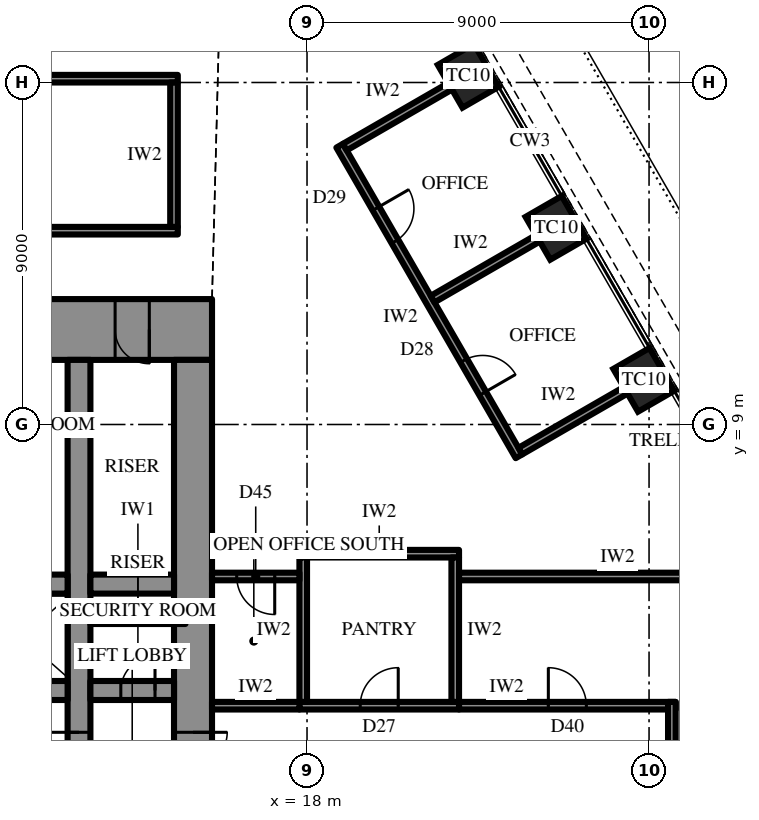
"""IFC4 building model, lengths in metres.
Left out: names, types, materials, properties, quantities, classifications, styles, units other than length and angle.
Written with IfcOpenShell. Run it as: python <this file> out.ifc"""

import sys

from ifc_helpers import new_model, si_unit, direction, frame, frame_2d, origin, origin_2d, place, context, subcontext, project, spatial, rectangle, extrude, element, fill, save


model = new_model("IFC4")
c1 = context("Model", 3, precision=1e-05, world=origin(), true_north=direction((0.0, 1.0)))
c2 = subcontext(c1, "Body", "Model", "MODEL_VIEW")
j1 = project(units=[si_unit("LENGTHUNIT", "METRE"), si_unit("PLANEANGLEUNIT", "RADIAN")], contexts=[c1])
p1 = place(None, origin())
s1 = spatial("IfcSite", under=j1, at=p1, CompositionType="ELEMENT")
p2 = place(p1, origin())
s2 = spatial("IfcBuilding", under=s1, at=p2, CompositionType="ELEMENT")
p3 = place(p2, frame((0.0, 0.0, 249.1)))
s3 = spatial("IfcBuildingStorey", under=s2, at=p3, CompositionType="ELEMENT", Elevation=249.1)
for number, where, z_axis, x_axis in (
    (1, (26.861, 10.175, 0.0), (0.0, 0.0, 1.0), (-0.5, 0.866, 0.0)),
    (2, (24.552, 14.175, 0.0), (0.0, 0.0, 1.0), (-0.5, 0.866, 0.0)),
    (3, (22.242, 18.175, 0.0), (0.0, 0.0, 1.0), (-0.5, 0.866, 0.0)),
):
    element("IfcColumn", number, at=place(p3, frame(where, z_axis=z_axis, x_axis=x_axis)), inside=s3, PredefinedType="COLUMN", context=c2, shape_type="SweptSolid", body=[
        extrude(rectangle(XDim=1.3, YDim=1.1, at=origin_2d()), origin(), (0.0, 0.0, 1.0), 4.2),
    ])
p4 = place(p3, frame((-15.5, 11.5, 0.0), z_axis=(0.0, 0.0, 1.0), x_axis=(1.0, 0.0, 0.0)))
e4 = element("IfcWall", 4, at=p4, inside=s3, PredefinedType="SHEAR", context=c2, shape_type="SweptSolid", body=[
    extrude(rectangle(XDim=31.0, YDim=1.6, at=frame_2d((15.5, 0.0))), origin(), (0.0, 0.0, 1.0), 4.2),
])
p5 = place(p4, frame((16.35, 0.0, 0.0)))
e5 = element("IfcOpeningElement", 5, at=p5, cuts=e4, PredefinedType="OPENING", context=c2, shape_type="SweptSolid", body=[
    extrude(rectangle(XDim=0.9, YDim=2.2, at=frame_2d((0.45, 1.1))), frame((0.0, 0.81, 0.0), z_axis=(0.0, -1.0, 0.0), x_axis=(1.0, 0.0, 0.0)), (0.0, 0.0, 1.0), 1.62),
])
p6 = place(p4, frame((19.35, 0.0, 0.0)))
e6 = element("IfcOpeningElement", 6, at=p6, cuts=e4, PredefinedType="OPENING", context=c2, shape_type="SweptSolid", body=[
    extrude(rectangle(XDim=0.9, YDim=2.2, at=frame_2d((0.45, 1.1))), frame((0.0, 0.81, 0.0), z_axis=(0.0, -1.0, 0.0), x_axis=(1.0, 0.0, 0.0)), (0.0, 0.0, 1.0), 1.62),
])
p7 = place(p4, frame((22.4, 0.0, 0.0)))
e7 = element("IfcOpeningElement", 7, at=p7, cuts=e4, PredefinedType="OPENING", context=c2, shape_type="SweptSolid", body=[
    extrude(rectangle(XDim=1.0, YDim=2.2, at=frame_2d((0.5, 1.1))), frame((0.0, 0.81, 0.0), z_axis=(0.0, -1.0, 0.0), x_axis=(1.0, 0.0, 0.0)), (0.0, 0.0, 1.0), 1.62),
])
p8 = place(p4, frame((1.65, 0.0, 0.0)))
e8 = element("IfcOpeningElement", 8, at=p8, cuts=e4, PredefinedType="OPENING", context=c2, shape_type="SweptSolid", body=[
    extrude(rectangle(XDim=0.9, YDim=2.2, at=frame_2d((0.45, 1.1))), frame((0.0, 0.81, 0.0), z_axis=(0.0, -1.0, 0.0), x_axis=(1.0, 0.0, 0.0)), (0.0, 0.0, 1.0), 1.62),
])
p9 = place(p4, frame((4.65, 0.0, 0.0)))
e9 = element("IfcOpeningElement", 9, at=p9, cuts=e4, PredefinedType="OPENING", context=c2, shape_type="SweptSolid", body=[
    extrude(rectangle(XDim=0.9, YDim=2.2, at=frame_2d((0.45, 1.1))), frame((0.0, 0.81, 0.0), z_axis=(0.0, -1.0, 0.0), x_axis=(1.0, 0.0, 0.0)), (0.0, 0.0, 1.0), 1.62),
])
p10 = place(p4, frame((25.45, 0.0, 0.0)))
e10 = element("IfcOpeningElement", 10, at=p10, cuts=e4, PredefinedType="OPENING", context=c2, shape_type="SweptSolid", body=[
    extrude(rectangle(XDim=0.9, YDim=2.2, at=frame_2d((0.45, 1.1))), frame((0.0, 0.81, 0.0), z_axis=(0.0, -1.0, 0.0), x_axis=(1.0, 0.0, 0.0)), (0.0, 0.0, 1.0), 1.62),
])
p11 = place(p4, frame((28.45, 0.0, 0.0)))
e11 = element("IfcOpeningElement", 11, at=p11, cuts=e4, PredefinedType="OPENING", context=c2, shape_type="SweptSolid", body=[
    extrude(rectangle(XDim=0.9, YDim=2.2, at=frame_2d((0.45, 1.1))), frame((0.0, 0.81, 0.0), z_axis=(0.0, -1.0, 0.0), x_axis=(1.0, 0.0, 0.0)), (0.0, 0.0, 1.0), 1.62),
])
p12 = place(p3, frame((15.0, -10.7, 0.0), z_axis=(0.0, 0.0, 1.0), x_axis=(0.0, 1.0, 0.0)))
e12 = element("IfcWall", 12, at=p12, inside=s3, PredefinedType="SHEAR", context=c2, shape_type="SweptSolid", body=[
    extrude(rectangle(XDim=21.4, YDim=1.0, at=frame_2d((10.7, 0.0))), origin(), (0.0, 0.0, 1.0), 4.2),
])
p13 = place(p12, frame((9.8, 0.0, 0.0)))
e13 = element("IfcOpeningElement", 13, at=p13, cuts=e12, PredefinedType="OPENING", context=c2, shape_type="SweptSolid", body=[
    extrude(rectangle(XDim=1.8, YDim=2.4, at=frame_2d((0.9, 1.2))), frame((0.0, 0.51, 0.0), z_axis=(0.0, -1.0, 0.0), x_axis=(1.0, 0.0, 0.0)), (0.0, 0.0, 1.0), 1.02),
])
p14 = place(p3, frame((12.0, -10.7, 0.0), z_axis=(0.0, 0.0, 1.0), x_axis=(0.0, 1.0, 0.0)))
e14 = element("IfcWall", 14, at=p14, inside=s3, PredefinedType="SHEAR", context=c2, shape_type="SweptSolid", body=[
    extrude(rectangle(XDim=21.4, YDim=0.6, at=frame_2d((10.7, 0.0))), origin(), (0.0, 0.0, 1.0), 4.2),
])
p15 = place(p14, frame((9.8, 0.0, 0.0)))
e15 = element("IfcOpeningElement", 15, at=p15, cuts=e14, PredefinedType="OPENING", context=c2, shape_type="SweptSolid", body=[
    extrude(rectangle(XDim=1.8, YDim=2.4, at=frame_2d((0.9, 1.2))), frame((0.0, 0.31, 0.0), z_axis=(0.0, -1.0, 0.0), x_axis=(1.0, 0.0, 0.0)), (0.0, 0.0, 1.0), 0.62),
])
p16 = place(p3, frame((-3.2, 2.0, 0.0), z_axis=(0.0, 0.0, 1.0), x_axis=(1.0, 0.0, 0.0)))
e16 = element("IfcWall", 16, at=p16, inside=s3, PredefinedType="SHEAR", context=c2, shape_type="SweptSolid", body=[
    extrude(rectangle(XDim=14.9, YDim=0.5, at=frame_2d((7.45, 0.0))), origin(), (0.0, 0.0, 1.0), 4.2),
])
p17 = place(p16, frame((1.15, 0.0, 0.0)))
e17 = element("IfcOpeningElement", 17, at=p17, cuts=e16, PredefinedType="OPENING", context=c2, shape_type="SweptSolid", body=[
    extrude(rectangle(XDim=1.1, YDim=2.2, at=frame_2d((0.55, 1.1))), frame((0.0, 0.26, 0.0), z_axis=(0.0, -1.0, 0.0), x_axis=(1.0, 0.0, 0.0)), (0.0, 0.0, 1.0), 0.52),
])
p18 = place(p16, frame((4.15, 0.0, 0.0)))
e18 = element("IfcOpeningElement", 18, at=p18, cuts=e16, PredefinedType="OPENING", context=c2, shape_type="SweptSolid", body=[
    extrude(rectangle(XDim=1.1, YDim=2.2, at=frame_2d((0.55, 1.1))), frame((0.0, 0.26, 0.0), z_axis=(0.0, -1.0, 0.0), x_axis=(1.0, 0.0, 0.0)), (0.0, 0.0, 1.0), 0.52),
])
p19 = place(p16, frame((7.15, 0.0, 0.0)))
e19 = element("IfcOpeningElement", 19, at=p19, cuts=e16, PredefinedType="OPENING", context=c2, shape_type="SweptSolid", body=[
    extrude(rectangle(XDim=1.1, YDim=2.2, at=frame_2d((0.55, 1.1))), frame((0.0, 0.26, 0.0), z_axis=(0.0, -1.0, 0.0), x_axis=(1.0, 0.0, 0.0)), (0.0, 0.0, 1.0), 0.52),
])
p20 = place(p16, frame((10.15, 0.0, 0.0)))
e20 = element("IfcOpeningElement", 20, at=p20, cuts=e16, PredefinedType="OPENING", context=c2, shape_type="SweptSolid", body=[
    extrude(rectangle(XDim=1.1, YDim=2.2, at=frame_2d((0.55, 1.1))), frame((0.0, 0.26, 0.0), z_axis=(0.0, -1.0, 0.0), x_axis=(1.0, 0.0, 0.0)), (0.0, 0.0, 1.0), 0.52),
])
p21 = place(p3, frame((12.3, 2.0, 0.0), z_axis=(0.0, 0.0, 1.0), x_axis=(1.0, 0.0, 0.0)))
e21 = element("IfcWall", 21, at=p21, inside=s3, PredefinedType="SHEAR", context=c2, shape_type="SweptSolid", body=[
    extrude(rectangle(XDim=2.2, YDim=0.5, at=frame_2d((1.1, 0.0))), origin(), (0.0, 0.0, 1.0), 4.2),
])
p22 = place(p21, frame((0.8, 0.0, 0.0)))
e22 = element("IfcOpeningElement", 22, at=p22, cuts=e21, PredefinedType="OPENING", context=c2, shape_type="SweptSolid", body=[
    extrude(rectangle(XDim=0.9, YDim=2.2, at=frame_2d((0.45, 1.1))), frame((0.0, 0.26, 0.0), z_axis=(0.0, -1.0, 0.0), x_axis=(1.0, 0.0, 0.0)), (0.0, 0.0, 1.0), 0.52),
])
p23 = place(p3, frame((-11.7, 4.8, 0.0), z_axis=(0.0, 0.0, 1.0), x_axis=(1.0, 0.0, 0.0)))
e23 = element("IfcWall", 23, at=p23, inside=s3, PredefinedType="SHEAR", context=c2, shape_type="SweptSolid", body=[
    extrude(rectangle(XDim=23.4, YDim=0.5, at=frame_2d((11.7, 0.0))), origin(), (0.0, 0.0, 1.0), 4.2),
])
p24 = place(p23, frame((6.6, 0.0, 0.0)))
e24 = element("IfcOpeningElement", 24, at=p24, cuts=e23, PredefinedType="OPENING", context=c2, shape_type="SweptSolid", body=[
    extrude(rectangle(XDim=1.2, YDim=2.2, at=frame_2d((0.6, 1.1))), frame((0.0, 0.26, 0.0), z_axis=(0.0, -1.0, 0.0), x_axis=(1.0, 0.0, 0.0)), (0.0, 0.0, 1.0), 0.52),
])
p25 = place(p23, frame((3.6, 0.0, 0.0)))
e25 = element("IfcOpeningElement", 25, at=p25, cuts=e23, PredefinedType="OPENING", context=c2, shape_type="SweptSolid", body=[
    extrude(rectangle(XDim=1.2, YDim=2.2, at=frame_2d((0.6, 1.1))), frame((0.0, 0.26, 0.0), z_axis=(0.0, -1.0, 0.0), x_axis=(1.0, 0.0, 0.0)), (0.0, 0.0, 1.0), 0.52),
])
p26 = place(p3, frame((12.3, 4.8, 0.0), z_axis=(0.0, 0.0, 1.0), x_axis=(1.0, 0.0, 0.0)))
e26 = element("IfcWall", 26, at=p26, inside=s3, PredefinedType="SHEAR", context=c2, shape_type="SweptSolid", body=[
    extrude(rectangle(XDim=2.2, YDim=0.5, at=frame_2d((1.1, 0.0))), origin(), (0.0, 0.0, 1.0), 4.2),
])
p27 = place(p3, frame((12.3, 3.85, 0.0), z_axis=(0.0, 0.0, 1.0), x_axis=(1.0, 0.0, 0.0)))
e27 = element("IfcWall", 27, at=p27, inside=s3, PredefinedType="PARTITIONING", context=c2, shape_type="SweptSolid", body=[
    extrude(rectangle(XDim=2.5, YDim=0.2, at=frame_2d((1.25, 0.0))), origin(), (0.0, 0.0, 1.0), 4.0),
])
p28 = place(p3, frame((-14.6, 14.1, 0.0), z_axis=(0.0, 0.0, 1.0), x_axis=(1.0, 0.0, 0.0)))
e28 = element("IfcWall", 28, at=p28, inside=s3, PredefinedType="PARTITIONING", context=c2, shape_type="SweptSolid", body=[
    extrude(rectangle(XDim=29.2, YDim=0.2, at=frame_2d((14.6, 0.0))), origin(), (0.0, 0.0, 1.0), 4.0),
])
p29 = place(p3, frame((-14.6, 18.1, 0.0), z_axis=(0.0, 0.0, 1.0), x_axis=(1.0, 0.0, 0.0)))
e29 = element("IfcWall", 29, at=p29, inside=s3, PredefinedType="PARTITIONING", context=c2, shape_type="SweptSolid", body=[
    extrude(rectangle(XDim=29.2, YDim=0.2, at=frame_2d((14.6, 0.0))), origin(), (0.0, 0.0, 1.0), 4.0),
])
p30 = place(p29, frame((13.7, 0.0, 0.0)))
e30 = element("IfcOpeningElement", 30, at=p30, cuts=e29, PredefinedType="OPENING", context=c2, shape_type="SweptSolid", body=[
    extrude(rectangle(XDim=1.8, YDim=2.4, at=frame_2d((0.9, 1.2))), frame((0.0, 0.11, 0.0), z_axis=(0.0, -1.0, 0.0), x_axis=(1.0, 0.0, 0.0)), (0.0, 0.0, 1.0), 0.22),
])
p31 = place(p3, frame((14.5, 14.2, 0.0), z_axis=(0.0, 0.0, 1.0), x_axis=(0.0, 1.0, 0.0)))
e31 = element("IfcWall", 31, at=p31, inside=s3, PredefinedType="PARTITIONING", context=c2, shape_type="SweptSolid", body=[
    extrude(rectangle(XDim=3.8, YDim=0.2, at=frame_2d((1.9, 0.0))), origin(), (0.0, 0.0, 1.0), 4.0),
])
p32 = place(p3, frame((23.577, 8.163, 0.0), z_axis=(0.0, 0.0, 1.0), x_axis=(-0.499989672313, 0.866031366395, 0.0)))
e32 = element("IfcWall", 32, at=p32, inside=s3, PredefinedType="PARTITIONING", context=c2, shape_type="SweptSolid", body=[
    extrude(rectangle(XDim=9.438, YDim=0.2, at=frame_2d((4.719, 0.0))), origin(), (0.0, 0.0, 1.0), 4.0),
])
p33 = place(p32, frame((1.909, 0.0, 0.0)))
e33 = element("IfcOpeningElement", 33, at=p33, cuts=e32, PredefinedType="OPENING", context=c2, shape_type="SweptSolid", body=[
    extrude(rectangle(XDim=1.0, YDim=2.2, at=frame_2d((0.5, 1.1))), frame((0.0, 0.11, 0.0), z_axis=(0.0, -1.0, 0.0), x_axis=(1.0, 0.0, 0.0)), (0.0, 0.0, 1.0), 0.22),
])
p34 = place(p32, frame((6.528, 0.0, 0.0)))
e34 = element("IfcOpeningElement", 34, at=p34, cuts=e32, PredefinedType="OPENING", context=c2, shape_type="SweptSolid", body=[
    extrude(rectangle(XDim=1.0, YDim=2.2, at=frame_2d((0.5, 1.1))), frame((0.0, 0.11, 0.0), z_axis=(0.0, -1.0, 0.0), x_axis=(1.0, 0.0, 0.0)), (0.0, 0.0, 1.0), 0.22),
])
p35 = place(p3, frame((23.614, 8.3, 0.0), z_axis=(0.0, 0.0, 1.0), x_axis=(0.866061088033, 0.499938187974, 0.0)))
e35 = element("IfcWall", 35, at=p35, inside=s3, PredefinedType="PARTITIONING", context=c2, shape_type="SweptSolid", body=[
    extrude(rectangle(XDim=3.2, YDim=0.2, at=frame_2d((1.6, 0.0))), origin(), (0.0, 0.0, 1.0), 3.082),
])
for number, where, z_axis, x_axis in (
    (36, (21.304, 12.3, 0.0), (0.0, 0.0, 1.0), (0.866, 0.5, 0.0)),
    (37, (18.995, 16.3, 0.0), (0.0, 0.0, 1.0), (0.866, 0.5, 0.0)),
):
    element("IfcWall", number, at=place(p3, frame(where, z_axis=z_axis, x_axis=x_axis)), inside=s3, PredefinedType="PARTITIONING", context=c2, shape_type="SweptSolid", body=[
        extrude(rectangle(XDim=3.2, YDim=0.2, at=frame_2d((1.6, 0.0))), origin(), (0.0, 0.0, 1.0), 3.082),
    ])
p36 = place(p3, frame((17.8, 1.6, 0.0), z_axis=(0.0, 0.0, 1.0), x_axis=(1.0, 0.0, 0.0)))
e38 = element("IfcWall", 38, at=p36, inside=s3, PredefinedType="PARTITIONING", context=c2, shape_type="SweptSolid", body=[
    extrude(rectangle(XDim=4.2, YDim=0.2, at=frame_2d((2.1, 0.0))), origin(), (0.0, 0.0, 1.0), 4.0),
])
p37 = place(p36, frame((1.6, 0.0, 0.0)))
e39 = element("IfcOpeningElement", 39, at=p37, cuts=e38, PredefinedType="OPENING", context=c2, shape_type="SweptSolid", body=[
    extrude(rectangle(XDim=1.0, YDim=2.2, at=frame_2d((0.5, 1.1))), frame((0.0, 0.11, 0.0), z_axis=(0.0, -1.0, 0.0), x_axis=(1.0, 0.0, 0.0)), (0.0, 0.0, 1.0), 0.22),
])
p38 = place(p3, frame((17.8, 5.6, 0.0), z_axis=(0.0, 0.0, 1.0), x_axis=(1.0, 0.0, 0.0)))
e40 = element("IfcWall", 40, at=p38, inside=s3, PredefinedType="PARTITIONING", context=c2, shape_type="SweptSolid", body=[
    extrude(rectangle(XDim=4.2, YDim=0.2, at=frame_2d((2.1, 0.0))), origin(), (0.0, 0.0, 1.0), 4.0),
])
for number, where, z_axis, x_axis in (
    (41, (17.9, 1.7, 0.0), (0.0, 0.0, 1.0), (0.0, 1.0, 0.0)),
    (42, (21.9, 1.7, 0.0), (0.0, 0.0, 1.0), (0.0, 1.0, 0.0)),
):
    element("IfcWall", number, at=place(p3, frame(where, z_axis=z_axis, x_axis=x_axis)), inside=s3, PredefinedType="PARTITIONING", context=c2, shape_type="SweptSolid", body=[
        extrude(rectangle(XDim=3.8, YDim=0.2, at=frame_2d((1.9, 0.0))), origin(), (0.0, 0.0, 1.0), 4.0),
    ])
p39 = place(p3, frame((15.5, 1.6, 0.0), z_axis=(0.0, 0.0, 1.0), x_axis=(1.0, 0.0, 0.0)))
e43 = element("IfcWall", 43, at=p39, inside=s3, PredefinedType="PARTITIONING", context=c2, shape_type="SweptSolid", body=[
    extrude(rectangle(XDim=2.3, YDim=0.2, at=frame_2d((1.15, 0.0))), origin(), (0.0, 0.0, 1.0), 4.0),
])
p40 = place(p3, frame((22.0, 1.6, 0.0), z_axis=(0.0, 0.0, 1.0), x_axis=(1.0, 0.0, 0.0)))
e44 = element("IfcWall", 44, at=p40, inside=s3, PredefinedType="PARTITIONING", context=c2, shape_type="SweptSolid", body=[
    extrude(rectangle(XDim=5.7, YDim=0.2, at=frame_2d((2.85, 0.0))), origin(), (0.0, 0.0, 1.0), 4.0),
])
p41 = place(p40, frame((2.35, 0.0, 0.0)))
e45 = element("IfcOpeningElement", 45, at=p41, cuts=e44, PredefinedType="OPENING", context=c2, shape_type="SweptSolid", body=[
    extrude(rectangle(XDim=1.0, YDim=2.2, at=frame_2d((0.5, 1.1))), frame((0.0, 0.11, 0.0), z_axis=(0.0, -1.0, 0.0), x_axis=(1.0, 0.0, 0.0)), (0.0, 0.0, 1.0), 0.22),
])
p42 = place(p3, frame((27.6, -1.7, 0.0), z_axis=(0.0, 0.0, 1.0), x_axis=(0.0, 1.0, 0.0)))
e46 = element("IfcWall", 46, at=p42, inside=s3, PredefinedType="PARTITIONING", context=c2, shape_type="SweptSolid", body=[
    extrude(rectangle(XDim=3.4, YDim=0.2, at=frame_2d((1.7, 0.0))), origin(), (0.0, 0.0, 1.0), 4.0),
])
p43 = place(p42, frame((1.2, 0.0, 0.0)))
e47 = element("IfcOpeningElement", 47, at=p43, cuts=e46, PredefinedType="OPENING", context=c2, shape_type="SweptSolid", body=[
    extrude(rectangle(XDim=1.0, YDim=2.2, at=frame_2d((0.5, 1.1))), frame((0.0, 0.11, 0.0), z_axis=(0.0, -1.0, 0.0), x_axis=(1.0, 0.0, 0.0)), (0.0, 0.0, 1.0), 0.22),
])
p44 = place(p3, frame((15.5, 5.0, 0.0), z_axis=(0.0, 0.0, 1.0), x_axis=(1.0, 0.0, 0.0)))
e48 = element("IfcWall", 48, at=p44, inside=s3, PredefinedType="PARTITIONING", context=c2, shape_type="SweptSolid", body=[
    extrude(rectangle(XDim=2.3, YDim=0.2, at=frame_2d((1.15, 0.0))), origin(), (0.0, 0.0, 1.0), 4.0),
])
p45 = place(p44, frame((0.65, 0.0, 0.0)))
e49 = element("IfcOpeningElement", 49, at=p45, cuts=e48, PredefinedType="OPENING", context=c2, shape_type="SweptSolid", body=[
    extrude(rectangle(XDim=1.0, YDim=2.2, at=frame_2d((0.5, 1.1))), frame((0.0, 0.11, 0.0), z_axis=(0.0, -1.0, 0.0), x_axis=(1.0, 0.0, 0.0)), (0.0, 0.0, 1.0), 0.22),
])
p46 = place(p3, frame((22.0, 5.0, 0.0), z_axis=(0.0, 0.0, 1.0), x_axis=(1.0, 0.0, 0.0)))
e50 = element("IfcWall", 50, at=p46, inside=s3, PredefinedType="PARTITIONING", context=c2, shape_type="SweptSolid", body=[
    extrude(rectangle(XDim=8.345, YDim=0.2, at=frame_2d((4.173, 0.0))), origin(), (0.0, 0.0, 1.0), 4.0),
])
p47 = place(p13, frame((1.8, 0.0, 0.0), z_axis=(0.0, 0.0, 1.0), x_axis=(-1.0, 0.0, 0.0)))
e51 = element("IfcDoor", 51, at=p47, inside=s3, OperationType="DOUBLE_DOOR_SINGLE_SWING", PredefinedType="DOOR", context=c2, shape_type="SweptSolid", body=[
    extrude(rectangle(XDim=1.8, YDim=2.4, at=frame_2d((0.9, 1.2))), frame((0.0, 0.025, 0.0), z_axis=(0.0, -1.0, 0.0), x_axis=(1.0, 0.0, 0.0)), (0.0, 0.0, 1.0), 0.05),
])
fill(e13, e51)
p48 = place(p11, frame((0.9, 0.0, 0.0), z_axis=(0.0, 0.0, 1.0), x_axis=(-1.0, 0.0, 0.0)))
e52 = element("IfcDoor", 52, at=p48, inside=s3, OperationType="SINGLE_SWING_RIGHT", PredefinedType="DOOR", context=c2, shape_type="SweptSolid", body=[
    extrude(rectangle(XDim=0.9, YDim=2.2, at=frame_2d((0.45, 1.1))), frame((0.0, 0.025, 0.0), z_axis=(0.0, -1.0, 0.0), x_axis=(1.0, 0.0, 0.0)), (0.0, 0.0, 1.0), 0.05),
])
fill(e11, e52)
p49 = place(p22, origin())
e53 = element("IfcDoor", 53, at=p49, inside=s3, OperationType="SINGLE_SWING_LEFT", PredefinedType="DOOR", context=c2, shape_type="SweptSolid", body=[
    extrude(rectangle(XDim=0.9, YDim=2.2, at=frame_2d((0.45, 1.1))), frame((0.0, 0.025, 0.0), z_axis=(0.0, -1.0, 0.0), x_axis=(1.0, 0.0, 0.0)), (0.0, 0.0, 1.0), 0.05),
])
fill(e22, e53)
p50 = place(p15, origin())
e54 = element("IfcDoor", 54, at=p50, inside=s3, OperationType="DOUBLE_DOOR_SINGLE_SWING", PredefinedType="DOOR", context=c2, shape_type="SweptSolid", body=[
    extrude(rectangle(XDim=1.8, YDim=2.4, at=frame_2d((0.9, 1.2))), frame((0.0, 0.025, 0.0), z_axis=(0.0, -1.0, 0.0), x_axis=(1.0, 0.0, 0.0)), (0.0, 0.0, 1.0), 0.05),
])
fill(e15, e54)
p51 = place(p33, frame((1.0, 0.0, 0.0), z_axis=(0.0, 0.0, 1.0), x_axis=(-1.0, 0.0, 0.0)))
e55 = element("IfcDoor", 55, at=p51, inside=s3, OperationType="SINGLE_SWING_LEFT", PredefinedType="DOOR", context=c2, shape_type="SweptSolid", body=[
    extrude(rectangle(XDim=1.0, YDim=2.2, at=frame_2d((0.5, 1.1))), frame((0.0, 0.025, 0.0), z_axis=(0.0, -1.0, 0.0), x_axis=(1.0, 0.0, 0.0)), (0.0, 0.0, 1.0), 0.05),
])
fill(e33, e55)
p52 = place(p34, frame((1.0, 0.0, 0.0), z_axis=(0.0, 0.0, 1.0), x_axis=(-1.0, 0.0, 0.0)))
e56 = element("IfcDoor", 56, at=p52, inside=s3, OperationType="SINGLE_SWING_RIGHT", PredefinedType="DOOR", context=c2, shape_type="SweptSolid", body=[
    extrude(rectangle(XDim=1.0, YDim=2.2, at=frame_2d((0.5, 1.1))), frame((0.0, 0.025, 0.0), z_axis=(0.0, -1.0, 0.0), x_axis=(1.0, 0.0, 0.0)), (0.0, 0.0, 1.0), 0.05),
])
fill(e34, e56)
p53 = place(p37, origin())
e57 = element("IfcDoor", 57, at=p53, inside=s3, OperationType="SINGLE_SWING_LEFT", PredefinedType="DOOR", context=c2, shape_type="SweptSolid", body=[
    extrude(rectangle(XDim=1.0, YDim=2.2, at=frame_2d((0.5, 1.1))), frame((0.0, 0.025, 0.0), z_axis=(0.0, -1.0, 0.0), x_axis=(1.0, 0.0, 0.0)), (0.0, 0.0, 1.0), 0.05),
])
fill(e39, e57)
p54 = place(p41, origin())
e58 = element("IfcDoor", 58, at=p54, inside=s3, OperationType="SINGLE_SWING_RIGHT", PredefinedType="DOOR", context=c2, shape_type="SweptSolid", body=[
    extrude(rectangle(XDim=1.0, YDim=2.2, at=frame_2d((0.5, 1.1))), frame((0.0, 0.025, 0.0), z_axis=(0.0, -1.0, 0.0), x_axis=(1.0, 0.0, 0.0)), (0.0, 0.0, 1.0), 0.05),
])
fill(e45, e58)
p55 = place(p45, frame((1.0, 0.0, 0.0), z_axis=(0.0, 0.0, 1.0), x_axis=(-1.0, 0.0, 0.0)))
e59 = element("IfcDoor", 59, at=p55, inside=s3, OperationType="SINGLE_SWING_RIGHT", PredefinedType="DOOR", context=c2, shape_type="SweptSolid", body=[
    extrude(rectangle(XDim=1.0, YDim=2.2, at=frame_2d((0.5, 1.1))), frame((0.0, 0.025, 0.0), z_axis=(0.0, -1.0, 0.0), x_axis=(1.0, 0.0, 0.0)), (0.0, 0.0, 1.0), 0.05),
])
fill(e49, e59)
save(model, sys.argv[1])
